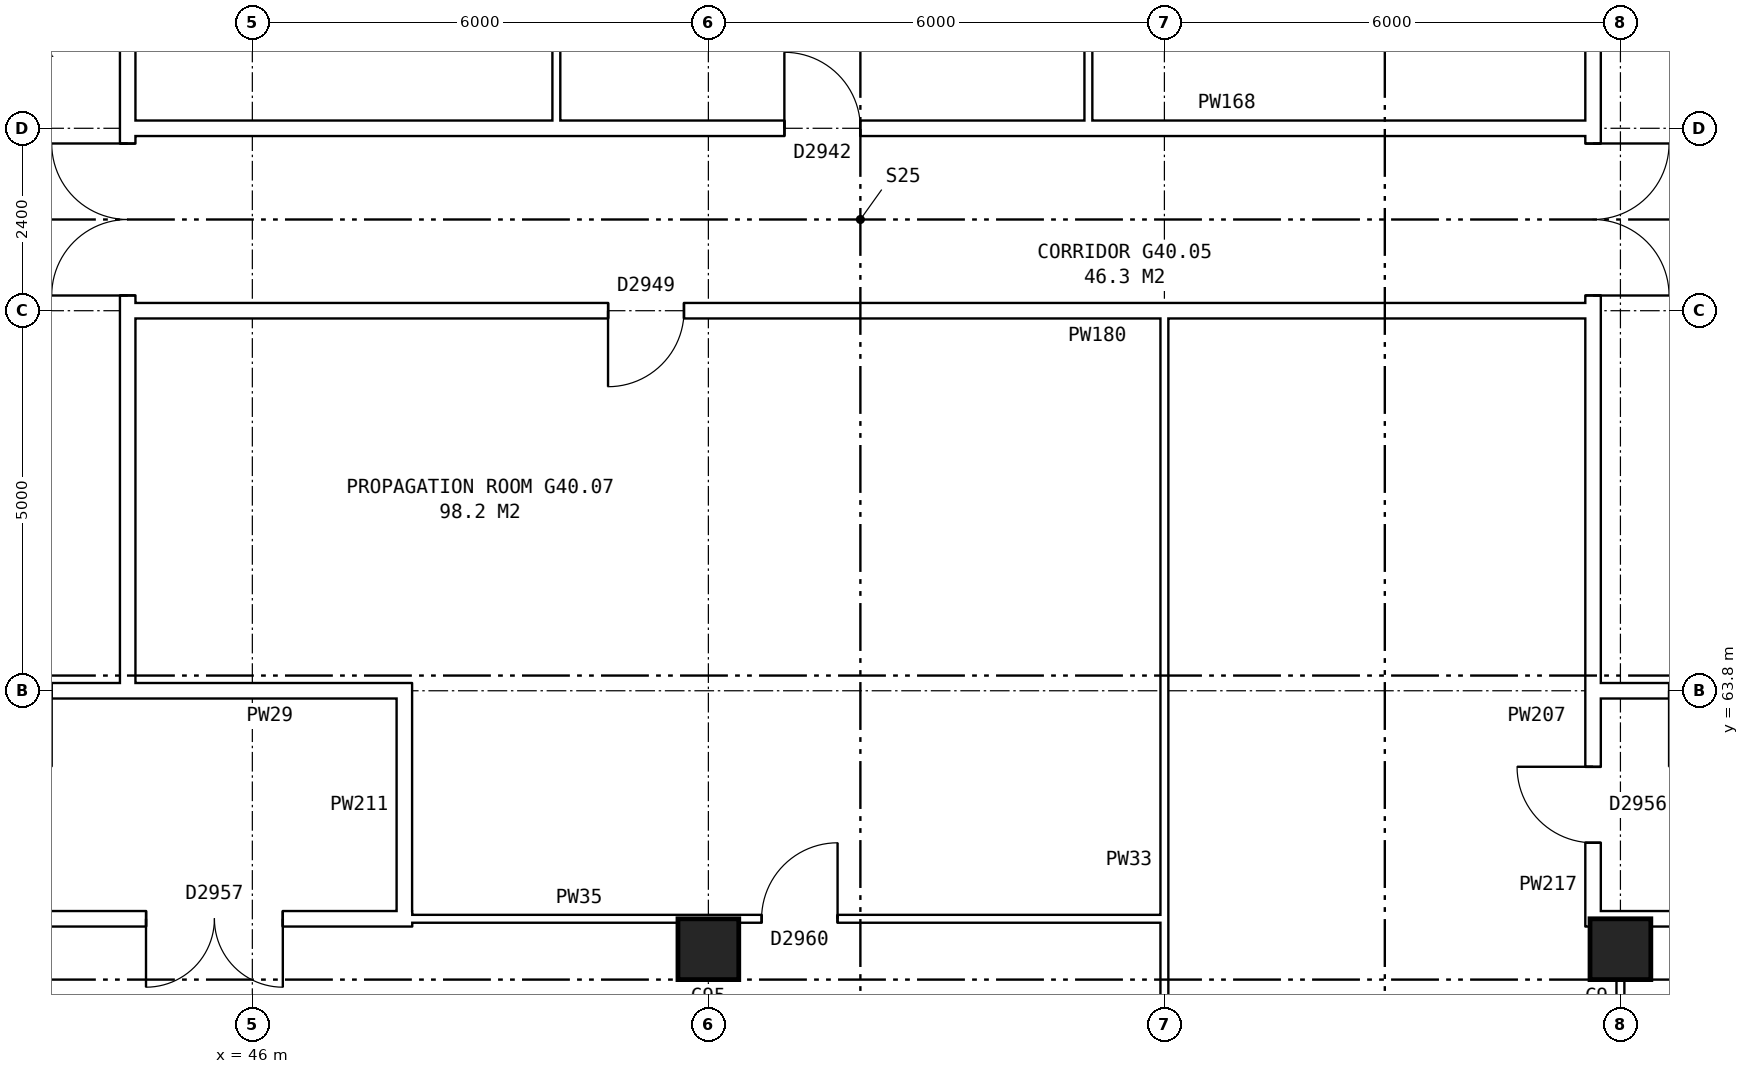
"""IFC4 building model, lengths in metres.
Left out: names, types, materials, properties, quantities, classifications, styles, units other than length and angle.
Written with IfcOpenShell. Run it as: python <this file> out.ifc"""

import sys

from ifc_helpers import new_model, si_unit, direction, frame, frame_2d, origin, origin_2d, place, context, subcontext, project, spatial, rectangle, extrude, element, fill, save


model = new_model("IFC4")
c1 = context("Model", 3, precision=1e-05, world=origin(), true_north=direction((0.0, 1.0)))
c2 = subcontext(c1, "Body", "Model", "MODEL_VIEW")
j1 = project(units=[si_unit("LENGTHUNIT", "METRE"), si_unit("PLANEANGLEUNIT", "RADIAN")], contexts=[c1])
p1 = place(None, origin())
s1 = spatial("IfcSite", under=j1, at=p1, CompositionType="ELEMENT")
p2 = place(p1, origin())
s2 = spatial("IfcBuilding", under=s1, at=p2, CompositionType="ELEMENT")
p3 = place(p2, frame((0.0, 0.0, 142.3)))
s3 = spatial("IfcBuildingStorey", under=s2, at=p3, CompositionType="ELEMENT", Elevation=142.3)
for number, where, z_axis, x_axis in (
    (1, (52.0, 60.4, 0.0), (0.0, 0.0, 1.0), (1.0, 0.0, 0.0)),
    (2, (64.0, 60.4, 0.0), (0.0, 0.0, 1.0), (1.0, 0.0, 0.0)),
):
    element("IfcColumn", number, at=place(p3, frame(where, z_axis=z_axis, x_axis=x_axis)), inside=s3, PredefinedType="COLUMN", context=c2, shape_type="SweptSolid", body=[
        extrude(rectangle(XDim=0.8, YDim=0.8, at=origin_2d()), origin(), (0.0, 0.0, 1.0), 5.6),
    ])
p4 = place(p3, frame((63.64, 63.9, 0.0), z_axis=(0.0, 0.0, 1.0), x_axis=(0.0, 1.0, 0.0)))
e3 = element("IfcWall", 3, at=p4, inside=s3, PredefinedType="PARTITIONING", context=c2, shape_type="SweptSolid", body=[
    extrude(rectangle(XDim=12.2, YDim=0.2, at=frame_2d((6.1, 0.0))), origin(), (0.0, 0.0, 1.0), 5.6),
])
p5 = place(p4, frame((5.1, 0.0, 0.0)))
e4 = element("IfcOpeningElement", 4, at=p5, cuts=e3, PredefinedType="OPENING", context=c2, shape_type="SweptSolid", body=[
    extrude(rectangle(XDim=2.0, YDim=2.1, at=frame_2d((1.0, 1.05))), frame((0.0, 0.11, 0.0), z_axis=(0.0, -1.0, 0.0), x_axis=(1.0, 0.0, 0.0)), (0.0, 0.0, 1.0), 0.22),
])
p6 = place(p3, frame((44.36, 63.9, 0.0), z_axis=(0.0, 0.0, 1.0), x_axis=(0.0, 1.0, 0.0)))
e5 = element("IfcWall", 5, at=p6, inside=s3, PredefinedType="PARTITIONING", context=c2, shape_type="SweptSolid", body=[
    extrude(rectangle(XDim=12.2, YDim=0.2, at=frame_2d((6.1, 0.0))), origin(), (0.0, 0.0, 1.0), 5.6),
])
p7 = place(p6, frame((5.1, 0.0, 0.0)))
e6 = element("IfcOpeningElement", 6, at=p7, cuts=e5, PredefinedType="OPENING", context=c2, shape_type="SweptSolid", body=[
    extrude(rectangle(XDim=2.0, YDim=2.1, at=frame_2d((1.0, 1.05))), frame((0.0, 0.11, 0.0), z_axis=(0.0, -1.0, 0.0), x_axis=(1.0, 0.0, 0.0)), (0.0, 0.0, 1.0), 0.22),
])
p8 = place(p3, frame((28.74, 60.8, 0.0), z_axis=(0.0, 0.0, 1.0), x_axis=(1.0, 0.0, 0.0)))
e7 = element("IfcWall", 7, at=p8, inside=s3, PredefinedType="PARTITIONING", context=c2, shape_type="SweptSolid", body=[
    extrude(rectangle(XDim=19.362, YDim=0.2, at=frame_2d((9.681, 0.0))), origin(), (0.0, 0.0, 1.0), 5.6),
])
p9 = place(p8, frame((3.69, 0.0, 0.0)))
e8 = element("IfcOpeningElement", 8, at=p9, cuts=e7, PredefinedType="OPENING", context=c2, shape_type="SweptSolid", body=[
    extrude(rectangle(XDim=1.0, YDim=2.1, at=frame_2d((0.5, 1.05))), frame((0.0, 0.11, 0.0), z_axis=(0.0, -1.0, 0.0), x_axis=(1.0, 0.0, 0.0)), (0.0, 0.0, 1.0), 0.22),
])
p10 = place(p8, frame((11.96, 0.0, 0.0)))
e9 = element("IfcOpeningElement", 9, at=p10, cuts=e7, PredefinedType="OPENING", context=c2, shape_type="SweptSolid", body=[
    extrude(rectangle(XDim=1.0, YDim=2.1, at=frame_2d((0.5, 1.05))), frame((0.0, 0.11, 0.0), z_axis=(0.0, -1.0, 0.0), x_axis=(1.0, 0.0, 0.0)), (0.0, 0.0, 1.0), 0.22),
])
p11 = place(p8, frame((15.861, 0.0, 0.0)))
e10 = element("IfcOpeningElement", 10, at=p11, cuts=e7, PredefinedType="OPENING", context=c2, shape_type="SweptSolid", body=[
    extrude(rectangle(XDim=1.8, YDim=2.1, at=frame_2d((0.9, 1.05))), frame((0.0, 0.11, 0.0), z_axis=(0.0, -1.0, 0.0), x_axis=(1.0, 0.0, 0.0)), (0.0, 0.0, 1.0), 0.22),
])
p12 = place(p3, frame((63.54, 60.8, 0.0), z_axis=(0.0, 0.0, 1.0), x_axis=(1.0, 0.0, 0.0)))
e11 = element("IfcWall", 11, at=p12, inside=s3, PredefinedType="PARTITIONING", context=c2, shape_type="SweptSolid", body=[
    extrude(rectangle(XDim=12.22, YDim=0.2, at=frame_2d((6.11, 0.0))), origin(), (0.0, 0.0, 1.0), 5.6),
])
p13 = place(p12, frame((2.96, 0.0, 0.0)))
e12 = element("IfcOpeningElement", 12, at=p13, cuts=e11, PredefinedType="OPENING", context=c2, shape_type="SweptSolid", body=[
    extrude(rectangle(XDim=1.0, YDim=2.1, at=frame_2d((0.5, 1.05))), frame((0.0, 0.11, 0.0), z_axis=(0.0, -1.0, 0.0), x_axis=(1.0, 0.0, 0.0)), (0.0, 0.0, 1.0), 0.22),
])
p14 = place(p12, frame((8.78, 0.0, 0.0)))
e13 = element("IfcOpeningElement", 13, at=p14, cuts=e11, PredefinedType="OPENING", context=c2, shape_type="SweptSolid", body=[
    extrude(rectangle(XDim=1.0, YDim=2.1, at=frame_2d((0.5, 1.05))), frame((0.0, 0.11, 0.0), z_axis=(0.0, -1.0, 0.0), x_axis=(1.0, 0.0, 0.0)), (0.0, 0.0, 1.0), 0.22),
])
p15 = place(p3, frame((47.9, 60.8, 0.0), z_axis=(0.0, 0.0, 1.0), x_axis=(1.0, 0.0, 0.0)))
e14 = element("IfcWall", 14, at=p15, inside=s3, PredefinedType="PARTITIONING", context=c2, shape_type="SweptSolid", body=[
    extrude(rectangle(XDim=10.15, YDim=0.1, at=frame_2d((5.075, 0.0))), origin(), (0.0, 0.0, 1.0), 5.6),
])
p16 = place(p15, frame((4.8, 0.0, 0.0)))
e15 = element("IfcOpeningElement", 15, at=p16, cuts=e14, PredefinedType="OPENING", context=c2, shape_type="SweptSolid", body=[
    extrude(rectangle(XDim=1.0, YDim=2.1, at=frame_2d((0.5, 1.05))), frame((0.0, 0.06, 0.0), z_axis=(0.0, -1.0, 0.0), x_axis=(1.0, 0.0, 0.0)), (0.0, 0.0, 1.0), 0.12),
])
p17 = place(p3, frame((44.36, 63.8, 0.0), z_axis=(0.0, 0.0, 1.0), x_axis=(1.0, 0.0, 0.0)))
e16 = element("IfcWall", 16, at=p17, inside=s3, PredefinedType="PARTITIONING", context=c2, shape_type="SweptSolid", body=[
    extrude(rectangle(XDim=3.74, YDim=0.2, at=frame_2d((1.87, 0.0))), origin(), (0.0, 0.0, 1.0), 5.6),
])
p18 = place(p3, frame((41.36, 63.8, 0.0), z_axis=(0.0, 0.0, 1.0), x_axis=(1.0, 0.0, 0.0)))
e17 = element("IfcWall", 17, at=p18, inside=s3, PredefinedType="PARTITIONING", context=c2, shape_type="SweptSolid", body=[
    extrude(rectangle(XDim=3.0, YDim=0.2, at=frame_2d((1.5, 0.0))), origin(), (0.0, 0.0, 1.0), 5.6),
])
p19 = place(p18, frame((1.0, 0.0, 0.0)))
e18 = element("IfcOpeningElement", 18, at=p19, cuts=e17, PredefinedType="OPENING", context=c2, shape_type="SweptSolid", body=[
    extrude(rectangle(XDim=1.0, YDim=2.1, at=frame_2d((0.5, 1.05))), frame((0.0, 0.11, 0.0), z_axis=(0.0, -1.0, 0.0), x_axis=(1.0, 0.0, 0.0)), (0.0, 0.0, 1.0), 0.22),
])
p20 = place(p3, frame((63.54, 63.8, 0.0), z_axis=(0.0, 0.0, 1.0), x_axis=(1.0, 0.0, 0.0)))
e19 = element("IfcWall", 19, at=p20, inside=s3, PredefinedType="PARTITIONING", context=c2, shape_type="SweptSolid", body=[
    extrude(rectangle(XDim=3.1, YDim=0.2, at=frame_2d((1.55, 0.0))), origin(), (0.0, 0.0, 1.0), 5.6),
])
p21 = place(p20, frame((1.1, 0.0, 0.0)))
e20 = element("IfcOpeningElement", 20, at=p21, cuts=e19, PredefinedType="OPENING", context=c2, shape_type="SweptSolid", body=[
    extrude(rectangle(XDim=1.0, YDim=2.1, at=frame_2d((0.5, 1.05))), frame((0.0, 0.11, 0.0), z_axis=(0.0, -1.0, 0.0), x_axis=(1.0, 0.0, 0.0)), (0.0, 0.0, 1.0), 0.22),
])
p22 = place(p3, frame((44.36, 68.8, 0.0), z_axis=(0.0, 0.0, 1.0), x_axis=(1.0, 0.0, 0.0)))
e21 = element("IfcWall", 21, at=p22, inside=s3, PredefinedType="PARTITIONING", context=c2, shape_type="SweptSolid", body=[
    extrude(rectangle(XDim=19.28, YDim=0.2, at=frame_2d((9.64, 0.0))), origin(), (0.0, 0.0, 1.0), 5.6),
])
p23 = place(p22, frame((6.32, 0.0, 0.0)))
e22 = element("IfcOpeningElement", 22, at=p23, cuts=e21, PredefinedType="OPENING", context=c2, shape_type="SweptSolid", body=[
    extrude(rectangle(XDim=1.0, YDim=2.1, at=frame_2d((0.5, 1.05))), frame((0.0, 0.11, 0.0), z_axis=(0.0, -1.0, 0.0), x_axis=(1.0, 0.0, 0.0)), (0.0, 0.0, 1.0), 0.22),
])
p24 = place(p3, frame((44.36, 71.2, 0.0), z_axis=(0.0, 0.0, 1.0), x_axis=(1.0, 0.0, 0.0)))
e23 = element("IfcWall", 23, at=p24, inside=s3, PredefinedType="PARTITIONING", context=c2, shape_type="SweptSolid", body=[
    extrude(rectangle(XDim=19.28, YDim=0.2, at=frame_2d((9.64, 0.0))), origin(), (0.0, 0.0, 1.0), 5.6),
])
p25 = place(p24, frame((8.64, 0.0, 0.0)))
e24 = element("IfcOpeningElement", 24, at=p25, cuts=e23, PredefinedType="OPENING", context=c2, shape_type="SweptSolid", body=[
    extrude(rectangle(XDim=1.0, YDim=2.1, at=frame_2d((0.5, 1.05))), frame((0.0, 0.11, 0.0), z_axis=(0.0, -1.0, 0.0), x_axis=(1.0, 0.0, 0.0)), (0.0, 0.0, 1.0), 0.22),
])
p26 = place(p3, frame((48.0, 60.7, 0.0), z_axis=(0.0, 0.0, 1.0), x_axis=(0.0, 1.0, 0.0)))
e25 = element("IfcWall", 25, at=p26, inside=s3, PredefinedType="PARTITIONING", context=c2, shape_type="SweptSolid", body=[
    extrude(rectangle(XDim=3.2, YDim=0.2, at=frame_2d((1.6, 0.0))), origin(), (0.0, 0.0, 1.0), 5.6),
])
for number, where, z_axis, x_axis in (
    (26, (50.0, 71.1, 0.0), (0.0, 0.0, 1.0), (0.0, 1.0, 0.0)),
    (27, (57.0, 71.1, 0.0), (0.0, 0.0, 1.0), (0.0, 1.0, 0.0)),
):
    element("IfcWall", number, at=place(p3, frame(where, z_axis=z_axis, x_axis=x_axis)), inside=s3, PredefinedType="PARTITIONING", context=c2, shape_type="SweptSolid", body=[
        extrude(rectangle(XDim=8.15, YDim=0.1, at=frame_2d((4.075, 0.0))), origin(), (0.0, 0.0, 1.0), 5.6),
    ])
p27 = place(p3, frame((58.0, 54.24, 0.0), z_axis=(0.0, 0.0, 1.0), x_axis=(0.0, 1.0, 0.0)))
e28 = element("IfcWall", 28, at=p27, inside=s3, PredefinedType="PARTITIONING", context=c2, shape_type="SweptSolid", body=[
    extrude(rectangle(XDim=14.66, YDim=0.1, at=frame_2d((7.33, 0.0))), origin(), (0.0, 0.0, 1.0), 5.6),
])
p28 = place(p3, frame((63.64, 60.7, 0.0), z_axis=(0.0, 0.0, 1.0), x_axis=(0.0, 1.0, 0.0)))
e29 = element("IfcWall", 29, at=p28, inside=s3, PredefinedType="PARTITIONING", context=c2, shape_type="SweptSolid", body=[
    extrude(rectangle(XDim=3.2, YDim=0.2, at=frame_2d((1.6, 0.0))), origin(), (0.0, 0.0, 1.0), 5.6),
])
p29 = place(p28, frame((1.1, 0.0, 0.0)))
e30 = element("IfcOpeningElement", 30, at=p29, cuts=e29, PredefinedType="OPENING", context=c2, shape_type="SweptSolid", body=[
    extrude(rectangle(XDim=1.0, YDim=2.1, at=frame_2d((0.5, 1.05))), frame((0.0, 0.11, 0.0), z_axis=(0.0, -1.0, 0.0), x_axis=(1.0, 0.0, 0.0)), (0.0, 0.0, 1.0), 0.22),
])
p30 = place(p3, frame((64.0, 54.24, 0.0), z_axis=(0.0, 0.0, 1.0), x_axis=(0.0, 1.0, 0.0)))
e31 = element("IfcWall", 31, at=p30, inside=s3, PredefinedType="PARTITIONING", context=c2, shape_type="SweptSolid", body=[
    extrude(rectangle(XDim=6.66, YDim=0.1, at=frame_2d((3.33, 0.0))), origin(), (0.0, 0.0, 1.0), 5.6),
])
p31 = place(p5, frame((2.0, 0.0, 0.0), z_axis=(0.0, 0.0, 1.0), x_axis=(-1.0, 0.0, 0.0)))
e32 = element("IfcDoor", 32, at=p31, inside=s3, OperationType="DOUBLE_DOOR_SINGLE_SWING", PredefinedType="DOOR", context=c2, shape_type="SweptSolid", body=[
    extrude(rectangle(XDim=2.0, YDim=2.1, at=frame_2d((1.0, 1.05))), frame((0.0, 0.025, 0.0), z_axis=(0.0, -1.0, 0.0), x_axis=(1.0, 0.0, 0.0)), (0.0, 0.0, 1.0), 0.05),
])
fill(e4, e32)
p32 = place(p7, origin())
e33 = element("IfcDoor", 33, at=p32, inside=s3, OperationType="DOUBLE_DOOR_SINGLE_SWING", PredefinedType="DOOR", context=c2, shape_type="SweptSolid", body=[
    extrude(rectangle(XDim=2.0, YDim=2.1, at=frame_2d((1.0, 1.05))), frame((0.0, 0.025, 0.0), z_axis=(0.0, -1.0, 0.0), x_axis=(1.0, 0.0, 0.0)), (0.0, 0.0, 1.0), 0.05),
])
fill(e6, e33)
p33 = place(p11, frame((1.8, 0.0, 0.0), z_axis=(0.0, 0.0, 1.0), x_axis=(-1.0, 0.0, 0.0)))
e34 = element("IfcDoor", 34, at=p33, inside=s3, OperationType="DOUBLE_DOOR_SINGLE_SWING", PredefinedType="DOOR", context=c2, shape_type="SweptSolid", body=[
    extrude(rectangle(XDim=1.8, YDim=2.1, at=frame_2d((0.9, 1.05))), frame((0.0, 0.025, 0.0), z_axis=(0.0, -1.0, 0.0), x_axis=(1.0, 0.0, 0.0)), (0.0, 0.0, 1.0), 0.05),
])
fill(e10, e34)
p34 = place(p16, origin())
e35 = element("IfcDoor", 35, at=p34, inside=s3, OperationType="SINGLE_SWING_RIGHT", PredefinedType="DOOR", context=c2, shape_type="SweptSolid", body=[
    extrude(rectangle(XDim=1.0, YDim=2.1, at=frame_2d((0.5, 1.05))), frame((0.0, 0.025, 0.0), z_axis=(0.0, -1.0, 0.0), x_axis=(1.0, 0.0, 0.0)), (0.0, 0.0, 1.0), 0.05),
])
fill(e15, e35)
p35 = place(p23, frame((1.0, 0.0, 0.0), z_axis=(0.0, 0.0, 1.0), x_axis=(-1.0, 0.0, 0.0)))
e36 = element("IfcDoor", 36, at=p35, inside=s3, OperationType="SINGLE_SWING_RIGHT", PredefinedType="DOOR", context=c2, shape_type="SweptSolid", body=[
    extrude(rectangle(XDim=1.0, YDim=2.1, at=frame_2d((0.5, 1.05))), frame((0.0, 0.025, 0.0), z_axis=(0.0, -1.0, 0.0), x_axis=(1.0, 0.0, 0.0)), (0.0, 0.0, 1.0), 0.05),
])
fill(e22, e36)
p36 = place(p25, origin())
e37 = element("IfcDoor", 37, at=p36, inside=s3, OperationType="SINGLE_SWING_LEFT", PredefinedType="DOOR", context=c2, shape_type="SweptSolid", body=[
    extrude(rectangle(XDim=1.0, YDim=2.1, at=frame_2d((0.5, 1.05))), frame((0.0, 0.025, 0.0), z_axis=(0.0, -1.0, 0.0), x_axis=(1.0, 0.0, 0.0)), (0.0, 0.0, 1.0), 0.05),
])
fill(e24, e37)
p37 = place(p29, origin())
e38 = element("IfcDoor", 38, at=p37, inside=s3, OperationType="SINGLE_SWING_RIGHT", PredefinedType="DOOR", context=c2, shape_type="SweptSolid", body=[
    extrude(rectangle(XDim=1.0, YDim=2.1, at=frame_2d((0.5, 1.05))), frame((0.0, 0.025, 0.0), z_axis=(0.0, -1.0, 0.0), x_axis=(1.0, 0.0, 0.0)), (0.0, 0.0, 1.0), 0.05),
])
fill(e30, e38)
save(model, sys.argv[1])
